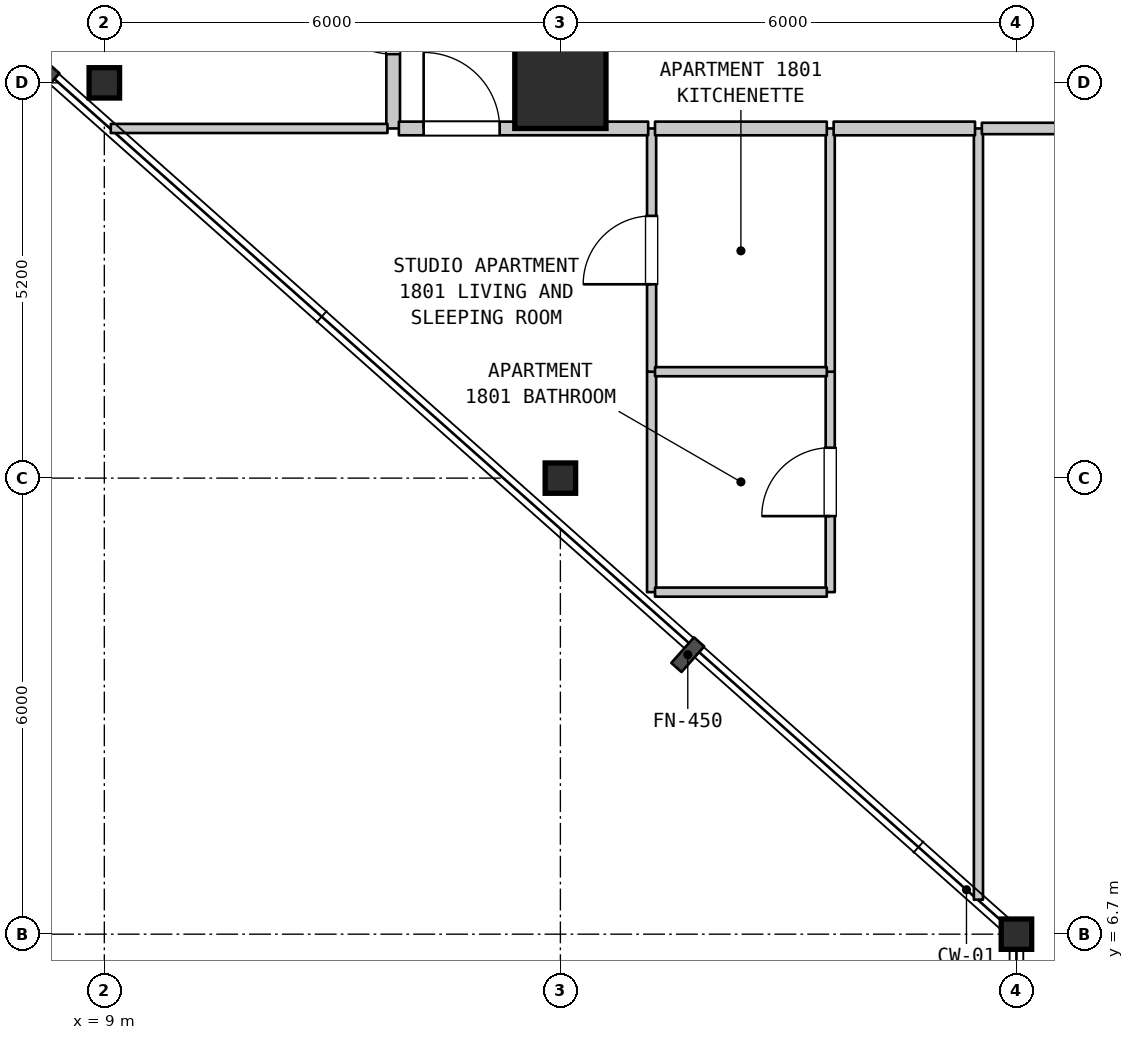
"""IFC4 building model, lengths in metres.
Left out: names, types, materials, properties, quantities, classifications, styles, units other than length and angle.
Written with IfcOpenShell. Run it as: python <this file> out.ifc"""

import sys

from ifc_helpers import new_model, si_unit, direction, frame, frame_2d, origin, origin_2d, place, context, subcontext, project, spatial, rectangle, i_section, extrude, element, fill, save


model = new_model("IFC4")
c1 = context("Model", 3, precision=1e-05, world=origin(), true_north=direction((0.0, 1.0)))
c2 = subcontext(c1, "Body", "Model", "MODEL_VIEW")
j1 = project(units=[si_unit("LENGTHUNIT", "METRE"), si_unit("PLANEANGLEUNIT", "RADIAN")], contexts=[c1])
p1 = place(None, origin())
s1 = spatial("IfcSite", under=j1, at=p1, CompositionType="ELEMENT")
p2 = place(p1, origin())
s2 = spatial("IfcBuilding", under=s1, at=p2, CompositionType="ELEMENT")
p3 = place(p2, frame((0.0, 0.0, 77.5)))
s3 = spatial("IfcBuildingStorey", under=s2, at=p3, CompositionType="ELEMENT", Elevation=77.5)
for number, where, z_axis, x_axis in (
    (1, (9.0, 17.9, 0.0), (0.0, 0.0, 1.0), (1.0, 0.0, 0.0)),
    (2, (15.0, 12.7, 0.0), (0.0, 0.0, 1.0), (1.0, 0.0, 0.0)),
):
    element("IfcColumn", number, at=place(p3, frame(where, z_axis=z_axis, x_axis=x_axis)), inside=s3, PredefinedType="COLUMN", context=c2, shape_type="SweptSolid", body=[
        extrude(i_section(OverallWidth=0.401, OverallDepth=0.399, WebThickness=0.025, FlangeThickness=0.04, FilletRadius=0.015, at=origin_2d()), origin(), (0.0, 0.0, 1.0), 3.7),
    ])
p4 = place(p3, frame((15.0, 17.9, 0.0), z_axis=(0.0, 0.0, 1.0), x_axis=(1.0, 0.0, 0.0)))
e3 = element("IfcColumn", 3, at=p4, inside=s3, PredefinedType="COLUMN", context=c2, shape_type="SweptSolid", body=[
    extrude(rectangle(XDim=1.2, YDim=1.2, at=origin_2d()), origin(), (0.0, 0.0, 1.0), 3.7),
])
p5 = place(p3, frame((21.0, 6.7, 0.0), z_axis=(0.0, 0.0, 1.0), x_axis=(1.0, 0.0, 0.0)))
e4 = element("IfcColumn", 4, at=p5, inside=s3, PredefinedType="COLUMN", context=c2, shape_type="SweptSolid", body=[
    extrude(i_section(OverallWidth=0.401, OverallDepth=0.399, WebThickness=0.025, FlangeThickness=0.04, FilletRadius=0.015, at=origin_2d()), origin(), (0.0, 0.0, 1.0), 3.7),
])
p6 = place(p3, frame((12.8, 17.3, 0.0), z_axis=(0.0, 0.0, 1.0), x_axis=(0.0, 1.0, 0.0)))
e5 = element("IfcWall", 5, at=p6, inside=s3, PredefinedType="STANDARD", context=c2, shape_type="SweptSolid", body=[
    extrude(rectangle(XDim=3.1, YDim=0.18, at=frame_2d((1.55, 0.0))), origin(), (0.0, 0.0, 1.0), 3.28),
])
p7 = place(p6, frame((0.978, 0.0, 0.0)))
e6 = element("IfcOpeningElement", 6, at=p7, cuts=e5, PredefinedType="OPENING", context=c2, shape_type="SweptSolid", body=[
    extrude(rectangle(XDim=1.0, YDim=2.15, at=frame_2d((0.5, 1.075))), frame((0.0, 0.1, 0.0), z_axis=(0.0, -1.0, 0.0), x_axis=(1.0, 0.0, 0.0)), (0.0, 0.0, 1.0), 0.2),
])
p8 = place(p3, frame((16.2, 11.2, 0.0), z_axis=(0.0, 0.0, 1.0), x_axis=(0.0, 1.0, 0.0)))
e7 = element("IfcWall", 7, at=p8, inside=s3, PredefinedType="PARTITIONING", context=c2, shape_type="SweptSolid", body=[
    extrude(rectangle(XDim=2.9, YDim=0.12, at=frame_2d((1.45, 0.0))), origin(), (0.0, 0.0, 1.0), 3.28),
])
p9 = place(p3, frame((16.2, 14.1, 0.0), z_axis=(0.0, 0.0, 1.0), x_axis=(0.0, 1.0, 0.0)))
e8 = element("IfcWall", 8, at=p9, inside=s3, PredefinedType="PARTITIONING", context=c2, shape_type="SweptSolid", body=[
    extrude(rectangle(XDim=3.2, YDim=0.12, at=frame_2d((1.6, 0.0))), origin(), (0.0, 0.0, 1.0), 3.28),
])
p10 = place(p9, frame((1.15, 0.0, 0.0)))
e9 = element("IfcOpeningElement", 9, at=p10, cuts=e8, PredefinedType="OPENING", context=c2, shape_type="SweptSolid", body=[
    extrude(rectangle(XDim=0.9, YDim=2.15, at=frame_2d((0.45, 1.075))), frame((0.0, 0.07, 0.0), z_axis=(0.0, -1.0, 0.0), x_axis=(1.0, 0.0, 0.0)), (0.0, 0.0, 1.0), 0.14),
])
p11 = place(p3, frame((18.55, 11.2, 0.0), z_axis=(0.0, 0.0, 1.0), x_axis=(0.0, 1.0, 0.0)))
e10 = element("IfcWall", 10, at=p11, inside=s3, PredefinedType="PARTITIONING", context=c2, shape_type="SweptSolid", body=[
    extrude(rectangle(XDim=2.9, YDim=0.12, at=frame_2d((1.45, 0.0))), origin(), (0.0, 0.0, 1.0), 3.28),
])
p12 = place(p11, frame((1.0, 0.0, 0.0)))
e11 = element("IfcOpeningElement", 11, at=p12, cuts=e10, PredefinedType="OPENING", context=c2, shape_type="SweptSolid", body=[
    extrude(rectangle(XDim=0.9, YDim=2.1, at=frame_2d((0.45, 1.05))), frame((0.0, 0.07, 0.0), z_axis=(0.0, -1.0, 0.0), x_axis=(1.0, 0.0, 0.0)), (0.0, 0.0, 1.0), 0.14),
])
p13 = place(p3, frame((18.55, 14.1, 0.0), z_axis=(0.0, 0.0, 1.0), x_axis=(0.0, 1.0, 0.0)))
e12 = element("IfcWall", 12, at=p13, inside=s3, PredefinedType="PARTITIONING", context=c2, shape_type="SweptSolid", body=[
    extrude(rectangle(XDim=3.2, YDim=0.12, at=frame_2d((1.6, 0.0))), origin(), (0.0, 0.0, 1.0), 3.28),
])
p14 = place(p3, frame((20.5, 7.154, 0.0), z_axis=(0.0, 0.0, 1.0), x_axis=(0.0, 1.0, 0.0)))
e13 = element("IfcWall", 13, at=p14, inside=s3, PredefinedType="PARTITIONING", context=c2, shape_type="SweptSolid", body=[
    extrude(rectangle(XDim=10.146, YDim=0.12, at=frame_2d((5.073, 0.0))), origin(), (0.0, 0.0, 1.0), 3.28),
])
for number, where, z_axis, x_axis in (
    (14, (16.245, 11.2, 0.0), (0.0, 0.0, 1.0), (1.0, 0.0, 0.0)),
    (15, (16.245, 14.1, 0.0), (0.0, 0.0, 1.0), (1.0, 0.0, 0.0)),
):
    element("IfcWall", number, at=place(p3, frame(where, z_axis=z_axis, x_axis=x_axis)), inside=s3, PredefinedType="PARTITIONING", context=c2, shape_type="SweptSolid", body=[
        extrude(rectangle(XDim=2.26, YDim=0.12, at=frame_2d((1.13, 0.0))), origin(), (0.0, 0.0, 1.0), 3.28),
    ])
p15 = place(p3, frame((9.085, 17.3, 0.0), z_axis=(0.0, 0.0, 1.0), x_axis=(1.0, 0.0, 0.0)))
e16 = element("IfcWall", 16, at=p15, inside=s3, PredefinedType="PARTITIONING", context=c2, shape_type="SweptSolid", body=[
    extrude(rectangle(XDim=3.64, YDim=0.12, at=frame_2d((1.82, 0.0))), origin(), (0.0, 0.0, 1.0), 3.28),
])
p16 = place(p3, frame((12.875, 17.3, 0.0), z_axis=(0.0, 0.0, 1.0), x_axis=(1.0, 0.0, 0.0)))
e17 = element("IfcWall", 17, at=p16, inside=s3, PredefinedType="STANDARD", context=c2, shape_type="SweptSolid", body=[
    extrude(rectangle(XDim=3.28, YDim=0.18, at=frame_2d((1.64, 0.0))), origin(), (0.0, 0.0, 1.0), 3.28),
])
p17 = place(p16, frame((0.326, 0.0, 0.0)))
e18 = element("IfcOpeningElement", 18, at=p17, cuts=e17, PredefinedType="OPENING", context=c2, shape_type="SweptSolid", body=[
    extrude(rectangle(XDim=1.0, YDim=2.15, at=frame_2d((0.5, 1.075))), frame((0.0, 0.1, 0.0), z_axis=(0.0, -1.0, 0.0), x_axis=(1.0, 0.0, 0.0)), (0.0, 0.0, 1.0), 0.2),
])
p18 = place(p3, frame((16.245, 17.3, 0.0), z_axis=(0.0, 0.0, 1.0), x_axis=(1.0, 0.0, 0.0)))
e19 = element("IfcWall", 19, at=p18, inside=s3, PredefinedType="STANDARD", context=c2, shape_type="SweptSolid", body=[
    extrude(rectangle(XDim=2.26, YDim=0.18, at=frame_2d((1.13, 0.0))), origin(), (0.0, 0.0, 1.0), 3.28),
])
p19 = place(p3, frame((18.595, 17.3, 0.0), z_axis=(0.0, 0.0, 1.0), x_axis=(1.0, 0.0, 0.0)))
e20 = element("IfcWall", 20, at=p19, inside=s3, PredefinedType="STANDARD", context=c2, shape_type="SweptSolid", body=[
    extrude(rectangle(XDim=1.86, YDim=0.18, at=frame_2d((0.93, 0.0))), origin(), (0.0, 0.0, 1.0), 3.28),
])
p20 = place(p3, frame((20.545, 17.3, 0.0), z_axis=(0.0, 0.0, 1.0), x_axis=(1.0, 0.0, 0.0)))
e21 = element("IfcWall", 21, at=p20, inside=s3, PredefinedType="STANDARD", context=c2, shape_type="SweptSolid", body=[
    extrude(rectangle(XDim=4.91, YDim=0.15, at=frame_2d((2.455, 0.0))), origin(), (0.0, 0.0, 1.0), 3.28),
])
p21 = place(p20, frame((1.884, 0.0, 0.0)))
e22 = element("IfcOpeningElement", 22, at=p21, cuts=e21, PredefinedType="OPENING", context=c2, shape_type="SweptSolid", body=[
    extrude(rectangle(XDim=1.0, YDim=2.15, at=frame_2d((0.5, 1.075))), frame((0.0, 0.085, 0.0), z_axis=(0.0, -1.0, 0.0), x_axis=(1.0, 0.0, 0.0)), (0.0, 0.0, 1.0), 0.17),
])
p22 = place(p7, origin())
e23 = element("IfcDoor", 23, at=p22, inside=s3, OperationType="SINGLE_SWING_RIGHT", PredefinedType="DOOR", context=c2, shape_type="SweptSolid", body=[
    extrude(rectangle(XDim=1.0, YDim=2.15, at=frame_2d((0.5, 1.075))), frame((0.0, 0.025, 0.0), z_axis=(0.0, -1.0, 0.0), x_axis=(1.0, 0.0, 0.0)), (0.0, 0.0, 1.0), 0.05),
])
fill(e6, e23)
p23 = place(p10, origin())
e24 = element("IfcDoor", 24, at=p23, inside=s3, OperationType="SINGLE_SWING_LEFT", PredefinedType="DOOR", context=c2, shape_type="SweptSolid", body=[
    extrude(rectangle(XDim=0.9, YDim=2.15, at=frame_2d((0.45, 1.075))), frame((0.0, 0.025, 0.0), z_axis=(0.0, -1.0, 0.0), x_axis=(1.0, 0.0, 0.0)), (0.0, 0.0, 1.0), 0.05),
])
fill(e9, e24)
p24 = place(p12, origin())
e25 = element("IfcDoor", 25, at=p24, inside=s3, OperationType="SINGLE_SWING_LEFT", PredefinedType="DOOR", context=c2, shape_type="SweptSolid", body=[
    extrude(rectangle(XDim=0.9, YDim=2.1, at=frame_2d((0.45, 1.05))), frame((0.0, 0.025, 0.0), z_axis=(0.0, -1.0, 0.0), x_axis=(1.0, 0.0, 0.0)), (0.0, 0.0, 1.0), 0.05),
])
fill(e11, e25)
p25 = place(p17, origin())
e26 = element("IfcDoor", 26, at=p25, inside=s3, OperationType="SINGLE_SWING_LEFT", PredefinedType="DOOR", context=c2, shape_type="SweptSolid", body=[
    extrude(rectangle(XDim=1.0, YDim=2.15, at=frame_2d((0.5, 1.075))), frame((0.0, 0.025, 0.0), z_axis=(0.0, -1.0, 0.0), x_axis=(1.0, 0.0, 0.0)), (0.0, 0.0, 1.0), 0.05),
])
fill(e18, e26)
save(model, sys.argv[1])
